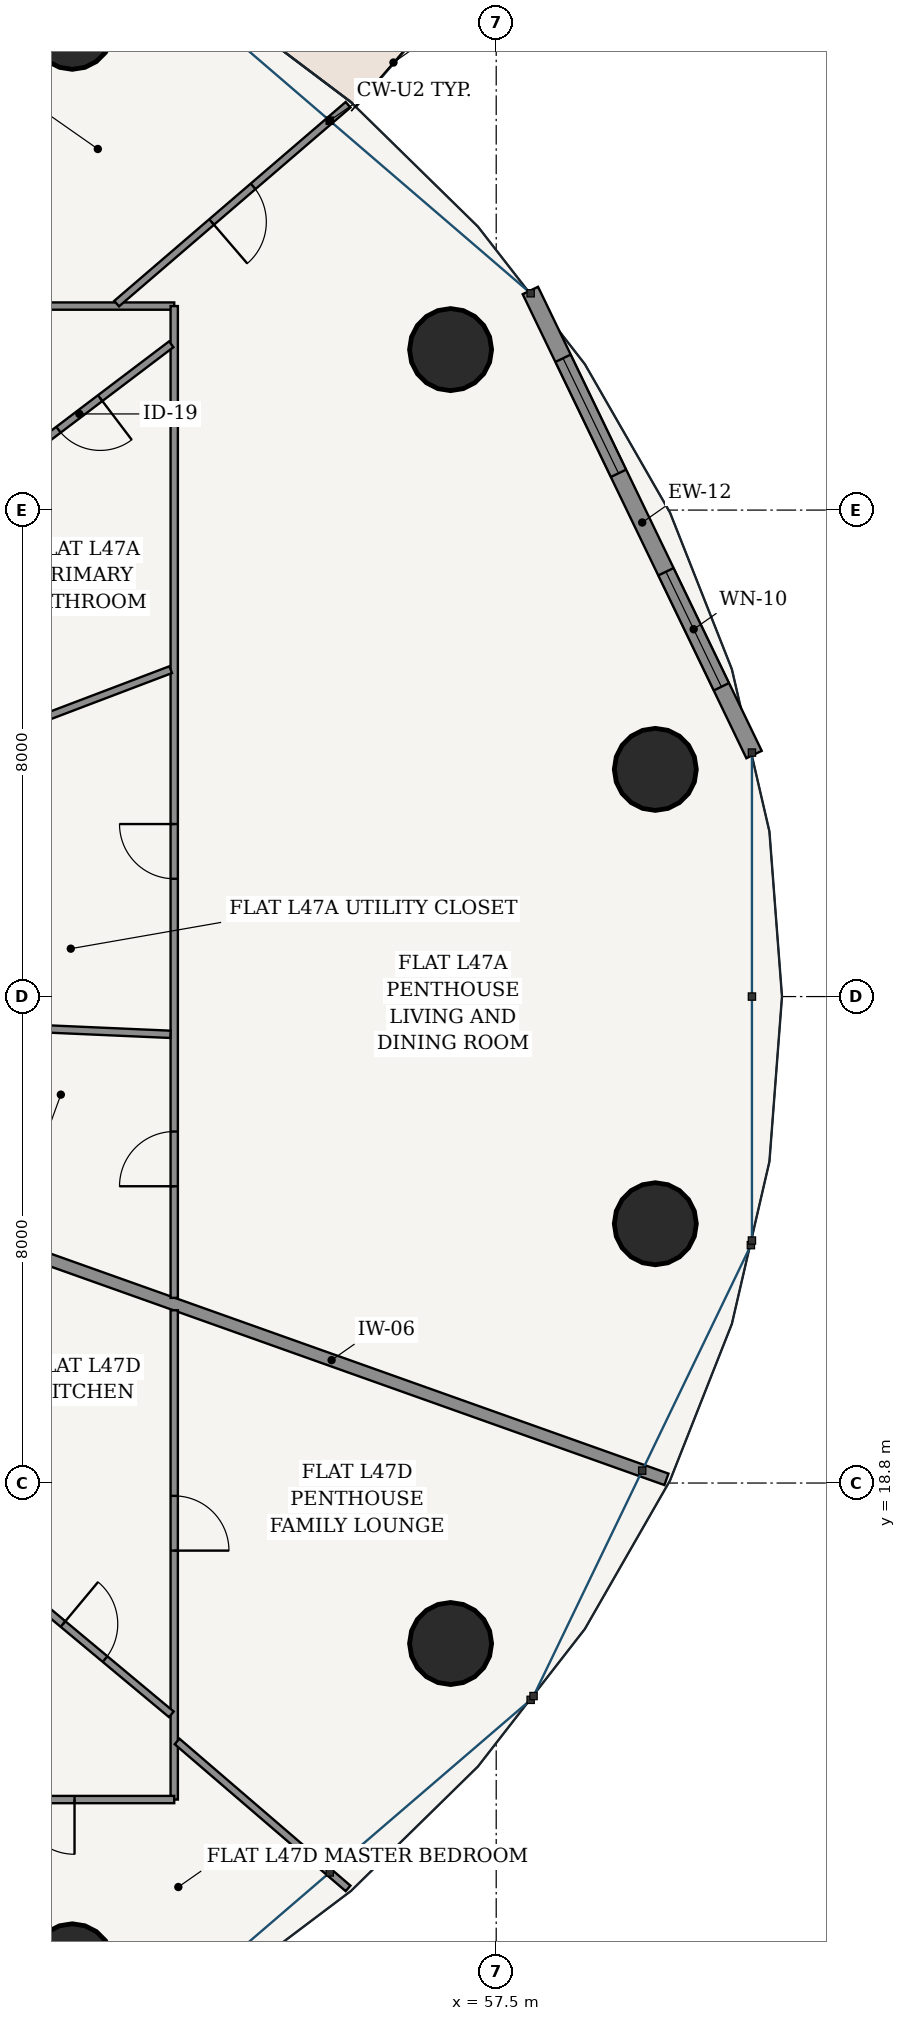
"""IFC4 building model, lengths in metres.
Left out: names, types, materials, properties, quantities, classifications, styles, units other than length and angle.
Written with IfcOpenShell. Run it as: python <this file> out.ifc"""

import sys

from ifc_helpers import new_model, si_unit, direction, frame, frame_2d, origin, origin_2d, place, context, subcontext, project, spatial, rectangle, hollow_circle, extrude, source, transform, mapped, element, fill, save


model = new_model("IFC4")
c1 = context("Model", 3, precision=1e-05, world=origin(), true_north=direction((-0.2419218956, 0.970295726276)))
c2 = subcontext(c1, "Body", "Model", "MODEL_VIEW")
j1 = project(units=[si_unit("LENGTHUNIT", "METRE"), si_unit("PLANEANGLEUNIT", "RADIAN")], contexts=[c1])
p1 = place(None, origin())
s1 = spatial("IfcSite", under=j1, at=p1, CompositionType="ELEMENT")
p2 = place(p1, origin())
s2 = spatial("IfcBuilding", under=s1, at=p2, CompositionType="ELEMENT")
p3 = place(p2, frame((0.0, 0.0, 178.6)))
s3 = spatial("IfcBuildingStorey", under=s2, at=p3, CompositionType="ELEMENT", Elevation=178.6)
for number, where, z_axis, x_axis in (
    (1, (60.117, 30.536, 0.0), (0.0, 0.0, 1.0), (1.0, 0.0, 0.0)),
    (2, (56.75, 37.439, 0.0), (0.0, 0.0, 1.0), (1.0, 0.0, 0.0)),
    (3, (50.528, 42.723, 0.0), (0.0, 0.0, 1.0), (1.0, 0.0, 0.0)),
    (4, (50.528, 10.877, 0.0), (0.0, 0.0, 1.0), (1.0, 0.0, 0.0)),
    (5, (56.75, 16.161, 0.0), (0.0, 0.0, 1.0), (1.0, 0.0, 0.0)),
    (6, (60.117, 23.064, 0.0), (0.0, 0.0, 1.0), (1.0, 0.0, 0.0)),
):
    element("IfcColumn", number, at=place(p3, frame(where, z_axis=z_axis, x_axis=x_axis)), inside=s3, PredefinedType="COLUMN", context=c2, shape_type="SweptSolid", body=[
        extrude(hollow_circle(Radius=0.675, WallThickness=0.042, at=origin_2d()), origin(), (0.0, 0.0, 1.0), 3.6),
    ])
p4 = place(p3, frame((61.74, 30.78, 0.0), z_axis=(0.0, 0.0, 1.0), x_axis=(-0.434209827226, 0.900811759437, 0.0)))
e7 = element("IfcWall", 7, at=p4, inside=s3, PredefinedType="SOLIDWALL", context=c2, shape_type="SweptSolid", body=[
    extrude(rectangle(XDim=8.472, YDim=0.28, at=frame_2d((4.236, 0.0))), origin(), (0.0, 0.0, 1.0), 3.33),
])
p5 = place(p4, frame((1.237, 0.0, 0.85)))
e8 = element("IfcOpeningElement", 8, at=p5, cuts=e7, PredefinedType="OPENING", context=c2, shape_type="SweptSolid", body=[
    extrude(rectangle(XDim=2.1, YDim=1.95, at=frame_2d((1.05, 0.975))), frame((0.0, 0.15, 0.0), z_axis=(0.0, -1.0, 0.0), x_axis=(1.0, 0.0, 0.0)), (0.0, 0.0, 1.0), 0.3),
])
p6 = place(p4, frame((5.134, 0.0, 0.85)))
e9 = element("IfcOpeningElement", 9, at=p6, cuts=e7, PredefinedType="OPENING", context=c2, shape_type="SweptSolid", body=[
    extrude(rectangle(XDim=2.1, YDim=1.95, at=frame_2d((1.05, 0.975))), frame((0.0, 0.15, 0.0), z_axis=(0.0, -1.0, 0.0), x_axis=(1.0, 0.0, 0.0)), (0.0, 0.0, 1.0), 0.3),
])
p7 = place(p3, frame((49.287, 22.782, 0.0), z_axis=(0.0, 0.0, 1.0), x_axis=(0.942076460895, -0.335398183996, 0.0)))
e10 = element("IfcWall", 10, at=p7, inside=s3, PredefinedType="PARTITIONING", context=c2, shape_type="SweptSolid", body=[
    extrude(rectangle(XDim=11.689, YDim=0.2, at=frame_2d((5.845, 0.0))), origin(), (0.0, 0.0, 1.0), 2.846),
])
p8 = place(p3, frame((44.195, 38.155, 0.0), z_axis=(0.0, 0.0, 1.0), x_axis=(1.0, 0.0, 0.0)))
e11 = element("IfcWall", 11, at=p8, inside=s3, PredefinedType="PARTITIONING", context=c2, shape_type="SweptSolid", body=[
    extrude(rectangle(XDim=8.01, YDim=0.12, at=frame_2d((4.005, 0.0))), origin(), (0.0, 0.0, 1.0), 2.776),
])
p9 = place(p8, frame((1.018, 0.0, 0.0)))
e12 = element("IfcOpeningElement", 12, at=p9, cuts=e11, PredefinedType="OPENING", context=c2, shape_type="SweptSolid", body=[
    extrude(rectangle(XDim=0.9, YDim=2.15, at=frame_2d((0.45, 1.075))), frame((0.0, 0.07, 0.0), z_axis=(0.0, -1.0, 0.0), x_axis=(1.0, 0.0, 0.0)), (0.0, 0.0, 1.0), 0.14),
])
p10 = place(p3, frame((52.205, 38.155, 0.0), z_axis=(0.0, 0.0, 1.0), x_axis=(0.0, -1.0, 0.0)))
e13 = element("IfcWall", 13, at=p10, inside=s3, PredefinedType="PARTITIONING", context=c2, shape_type="SweptSolid", body=[
    extrude(rectangle(XDim=16.31, YDim=0.12, at=frame_2d((8.155, 0.0))), origin(), (0.0, 0.0, 1.0), 2.776),
])
p11 = place(p10, frame((13.574, 0.0, 0.0)))
e14 = element("IfcOpeningElement", 14, at=p11, cuts=e13, PredefinedType="OPENING", context=c2, shape_type="SweptSolid", body=[
    extrude(rectangle(XDim=0.9, YDim=2.15, at=frame_2d((0.45, 1.075))), frame((0.0, 0.07, 0.0), z_axis=(0.0, -1.0, 0.0), x_axis=(1.0, 0.0, 0.0)), (0.0, 0.0, 1.0), 0.14),
])
p12 = place(p10, frame((8.518, 0.0, 0.0)))
e15 = element("IfcOpeningElement", 15, at=p12, cuts=e13, PredefinedType="OPENING", context=c2, shape_type="SweptSolid", body=[
    extrude(rectangle(XDim=0.9, YDim=2.15, at=frame_2d((0.45, 1.075))), frame((0.0, 0.07, 0.0), z_axis=(0.0, -1.0, 0.0), x_axis=(1.0, 0.0, 0.0)), (0.0, 0.0, 1.0), 0.14),
])
p13 = place(p3, frame((51.258, 38.195, 0.0), z_axis=(0.0, 0.0, 1.0), x_axis=(0.758369880373, 0.651824458381, 0.0)))
e16 = element("IfcWall", 16, at=p13, inside=s3, PredefinedType="PARTITIONING", context=c2, shape_type="SweptSolid", body=[
    extrude(rectangle(XDim=5.018, YDim=0.12, at=frame_2d((2.509, 0.0))), origin(), (0.0, 0.0, 1.0), 2.846),
])
p14 = place(p13, frame((2.059, 0.0, 0.0)))
e17 = element("IfcOpeningElement", 17, at=p14, cuts=e16, PredefinedType="OPENING", context=c2, shape_type="SweptSolid", body=[
    extrude(rectangle(XDim=0.9, YDim=2.15, at=frame_2d((0.45, 1.075))), frame((0.0, 0.07, 0.0), z_axis=(0.0, -1.0, 0.0), x_axis=(1.0, 0.0, 0.0)), (0.0, 0.0, 1.0), 0.14),
])
p15 = place(p3, frame((46.865, 38.204, 0.0), z_axis=(0.0, 0.0, 1.0), x_axis=(0.613754405153, 0.789497010859, 0.0)))
e18 = element("IfcWall", 18, at=p15, inside=s3, PredefinedType="PARTITIONING", context=c2, shape_type="SweptSolid", body=[
    extrude(rectangle(XDim=7.353, YDim=0.12, at=frame_2d((3.677, 0.0))), origin(), (0.0, 0.0, 1.0), 2.776),
])
p16 = place(p15, frame((2.224, 0.0, 0.0)))
e19 = element("IfcOpeningElement", 19, at=p16, cuts=e18, PredefinedType="OPENING", context=c2, shape_type="SweptSolid", body=[
    extrude(rectangle(XDim=0.9, YDim=2.15, at=frame_2d((0.45, 1.075))), frame((0.0, 0.07, 0.0), z_axis=(0.0, -1.0, 0.0), x_axis=(1.0, 0.0, 0.0)), (0.0, 0.0, 1.0), 0.14),
])
p17 = place(p3, frame((49.287, 26.304, 0.0), z_axis=(0.0, 0.0, 1.0), x_axis=(0.999039813392, -0.043811542509, 0.0)))
e20 = element("IfcWall", 20, at=p17, inside=s3, PredefinedType="PARTITIONING", context=c2, shape_type="SweptSolid", body=[
    extrude(rectangle(XDim=2.859, YDim=0.12, at=frame_2d((1.429, 0.0))), origin(), (0.0, 0.0, 1.0), 3.33),
])
p18 = place(p3, frame((49.287, 31.089, 0.0), z_axis=(0.0, 0.0, 1.0), x_axis=(0.934802126635, 0.3551689514, 0.0)))
e21 = element("IfcWall", 21, at=p18, inside=s3, PredefinedType="PARTITIONING", context=c2, shape_type="SweptSolid", body=[
    extrude(rectangle(XDim=3.06, YDim=0.12, at=frame_2d((1.53, 0.0))), origin(), (0.0, 0.0, 1.0), 3.33),
])
p19 = place(p3, frame((49.133, 35.236, 0.0), z_axis=(0.0, 0.0, 1.0), x_axis=(0.797054583929, 0.603907269568, 0.0)))
e22 = element("IfcWall", 22, at=p19, inside=s3, PredefinedType="PARTITIONING", context=c2, shape_type="SweptSolid", body=[
    extrude(rectangle(XDim=3.792, YDim=0.12, at=frame_2d((1.896, 0.0))), origin(), (0.0, 0.0, 1.0), 3.005),
])
p20 = place(p19, frame((1.466, 0.0, 0.0)))
e23 = element("IfcOpeningElement", 23, at=p20, cuts=e22, PredefinedType="OPENING", context=c2, shape_type="SweptSolid", body=[
    extrude(rectangle(XDim=0.86, YDim=2.15, at=frame_2d((0.43, 1.075))), frame((0.0, 0.07, 0.0), z_axis=(0.0, -1.0, 0.0), x_axis=(1.0, 0.0, 0.0)), (0.0, 0.0, 1.0), 0.14),
])
p21 = place(p3, frame((52.205, 21.641, 0.0), z_axis=(0.0, 0.0, 1.0), x_axis=(0.0, -1.0, 0.0)))
e24 = element("IfcWall", 24, at=p21, inside=s3, PredefinedType="PARTITIONING", context=c2, shape_type="SweptSolid", body=[
    extrude(rectangle(XDim=8.046, YDim=0.12, at=frame_2d((4.023, 0.0))), origin(), (0.0, 0.0, 1.0), 2.776),
])
p22 = place(p21, frame((3.052, 0.0, 0.0)))
e25 = element("IfcOpeningElement", 25, at=p22, cuts=e24, PredefinedType="OPENING", context=c2, shape_type="SweptSolid", body=[
    extrude(rectangle(XDim=0.9, YDim=2.15, at=frame_2d((0.45, 1.075))), frame((0.0, 0.07, 0.0), z_axis=(0.0, -1.0, 0.0), x_axis=(1.0, 0.0, 0.0)), (0.0, 0.0, 1.0), 0.14),
])
p23 = place(p3, frame((52.205, 13.595, 0.0), z_axis=(0.0, 0.0, 1.0), x_axis=(-1.0, 0.0, 0.0)))
e26 = element("IfcWall", 26, at=p23, inside=s3, PredefinedType="PARTITIONING", context=c2, shape_type="SweptSolid", body=[
    extrude(rectangle(XDim=17.159, YDim=0.12, at=frame_2d((8.58, 0.0))), origin(), (0.0, 0.0, 1.0), 2.776),
])
p24 = place(p23, frame((6.879, 0.0, 0.0)))
e27 = element("IfcOpeningElement", 27, at=p24, cuts=e26, PredefinedType="OPENING", context=c2, shape_type="SweptSolid", body=[
    extrude(rectangle(XDim=0.9, YDim=2.15, at=frame_2d((0.45, 1.075))), frame((0.0, 0.07, 0.0), z_axis=(0.0, -1.0, 0.0), x_axis=(1.0, 0.0, 0.0)), (0.0, 0.0, 1.0), 0.14),
])
p25 = place(p23, frame((1.64, 0.0, 0.0)))
e28 = element("IfcOpeningElement", 28, at=p25, cuts=e26, PredefinedType="OPENING", context=c2, shape_type="SweptSolid", body=[
    extrude(rectangle(XDim=0.9, YDim=2.15, at=frame_2d((0.45, 1.075))), frame((0.0, 0.07, 0.0), z_axis=(0.0, -1.0, 0.0), x_axis=(1.0, 0.0, 0.0)), (0.0, 0.0, 1.0), 0.14),
])
p26 = place(p3, frame((48.304, 13.546, 0.0), z_axis=(0.0, 0.0, 1.0), x_axis=(0.613734792328, -0.789512257464, 0.0)))
e29 = element("IfcWall", 29, at=p26, inside=s3, PredefinedType="PARTITIONING", context=c2, shape_type="SweptSolid", body=[
    extrude(rectangle(XDim=5.01, YDim=0.12, at=frame_2d((2.505, 0.0))), origin(), (0.0, 0.0, 1.0), 2.776),
])
p27 = place(p3, frame((52.252, 14.55, 0.0), z_axis=(0.0, 0.0, 1.0), x_axis=(0.758368113794, -0.651826513714, 0.0)))
e30 = element("IfcWall", 30, at=p27, inside=s3, PredefinedType="PARTITIONING", context=c2, shape_type="SweptSolid", body=[
    extrude(rectangle(XDim=3.708, YDim=0.12, at=frame_2d((1.854, 0.0))), origin(), (0.0, 0.0, 1.0), 2.846),
])
p28 = place(p3, frame((49.287, 17.39, 0.0), z_axis=(0.0, 0.0, 1.0), x_axis=(0.768065994597, -0.640370695725, 0.0)))
e31 = element("IfcWall", 31, at=p28, inside=s3, PredefinedType="PARTITIONING", context=c2, shape_type="SweptSolid", body=[
    extrude(rectangle(XDim=3.738, YDim=0.12, at=frame_2d((1.869, 0.0))), origin(), (0.0, 0.0, 1.0), 3.005),
])
p29 = place(p28, frame((1.419, 0.0, 0.0)))
e32 = element("IfcOpeningElement", 32, at=p29, cuts=e31, PredefinedType="OPENING", context=c2, shape_type="SweptSolid", body=[
    extrude(rectangle(XDim=0.9, YDim=2.15, at=frame_2d((0.45, 1.075))), frame((0.0, 0.07, 0.0), z_axis=(0.0, -1.0, 0.0), x_axis=(1.0, 0.0, 0.0)), (0.0, 0.0, 1.0), 0.14),
])
m1 = source(origin(), c2, "Body", "SweptSolid", [
    extrude(rectangle(XDim=2.1, YDim=1.95, at=frame_2d((1.05, 0.975))), frame((0.0, 0.03, 0.0), z_axis=(0.0, -1.0, 0.0), x_axis=(1.0, 0.0, 0.0)), (0.0, 0.0, 1.0), 0.06),
])
p30 = place(p5, origin())
e33 = element("IfcWindow", 33, at=p30, inside=s3, PartitioningType="SINGLE_PANEL", PredefinedType="WINDOW", context=c2, shape_type="MappedRepresentation", body=[
    mapped(m1, transform((0.0, 0.0, 0.0), scale=1.0)),
])
fill(e8, e33)
p31 = place(p6, origin())
e34 = element("IfcWindow", 34, at=p31, inside=s3, PartitioningType="SINGLE_PANEL", PredefinedType="WINDOW", context=c2, shape_type="MappedRepresentation", body=[
    mapped(m1, transform((0.0, 0.0, 0.0), scale=1.0)),
])
fill(e9, e34)
m2 = source(origin(), c2, "Body", "SweptSolid", [
    extrude(rectangle(XDim=0.86, YDim=2.15, at=frame_2d((0.43, 1.075))), frame((0.0, 0.025, 0.0), z_axis=(0.0, -1.0, 0.0), x_axis=(1.0, 0.0, 0.0)), (0.0, 0.0, 1.0), 0.05),
])
p32 = place(p20, frame((0.86, 0.0, 0.0), z_axis=(0.0, 0.0, 1.0), x_axis=(-1.0, 0.0, 0.0)))
e35 = element("IfcDoor", 35, at=p32, inside=s3, OperationType="SINGLE_SWING_LEFT", PredefinedType="DOOR", context=c2, shape_type="MappedRepresentation", body=[
    mapped(m2, transform((0.0, 0.0, 0.0), scale=1.0)),
])
fill(e23, e35)
m3 = source(origin(), c2, "Body", "SweptSolid", [
    extrude(rectangle(XDim=0.9, YDim=2.15, at=frame_2d((0.45, 1.075))), frame((0.0, 0.025, 0.0), z_axis=(0.0, -1.0, 0.0), x_axis=(1.0, 0.0, 0.0)), (0.0, 0.0, 1.0), 0.05),
])
p33 = place(p14, frame((0.9, 0.0, 0.0), z_axis=(0.0, 0.0, 1.0), x_axis=(-1.0, 0.0, 0.0)))
e36 = element("IfcDoor", 36, at=p33, inside=s3, OperationType="SINGLE_SWING_RIGHT", PredefinedType="DOOR", context=c2, shape_type="MappedRepresentation", body=[
    mapped(m3, transform((0.0, 0.0, 0.0), scale=1.0)),
])
fill(e17, e36)
p34 = place(p11, frame((0.9, 0.0, 0.0), z_axis=(0.0, 0.0, 1.0), x_axis=(-1.0, 0.0, 0.0)))
e37 = element("IfcDoor", 37, at=p34, inside=s3, OperationType="SINGLE_SWING_LEFT", PredefinedType="DOOR", context=c2, shape_type="MappedRepresentation", body=[
    mapped(m3, transform((0.0, 0.0, 0.0), scale=1.0)),
])
fill(e14, e37)
p35 = place(p12, frame((0.9, 0.0, 0.0), z_axis=(0.0, 0.0, 1.0), x_axis=(-1.0, 0.0, 0.0)))
e38 = element("IfcDoor", 38, at=p35, inside=s3, OperationType="SINGLE_SWING_RIGHT", PredefinedType="DOOR", context=c2, shape_type="MappedRepresentation", body=[
    mapped(m3, transform((0.0, 0.0, 0.0), scale=1.0)),
])
fill(e15, e38)
p36 = place(p29, origin())
e39 = element("IfcDoor", 39, at=p36, inside=s3, OperationType="SINGLE_SWING_LEFT", PredefinedType="DOOR", context=c2, shape_type="MappedRepresentation", body=[
    mapped(m3, transform((0.0, 0.0, 0.0), scale=1.0)),
])
fill(e32, e39)
p37 = place(p22, origin())
e40 = element("IfcDoor", 40, at=p37, inside=s3, OperationType="SINGLE_SWING_RIGHT", PredefinedType="DOOR", context=c2, shape_type="MappedRepresentation", body=[
    mapped(m3, transform((0.0, 0.0, 0.0), scale=1.0)),
])
fill(e25, e40)
p38 = place(p25, origin())
e41 = element("IfcDoor", 41, at=p38, inside=s3, OperationType="SINGLE_SWING_LEFT", PredefinedType="DOOR", context=c2, shape_type="MappedRepresentation", body=[
    mapped(m3, transform((0.0, 0.0, 0.0), scale=1.0)),
])
fill(e28, e41)
save(model, sys.argv[1])
